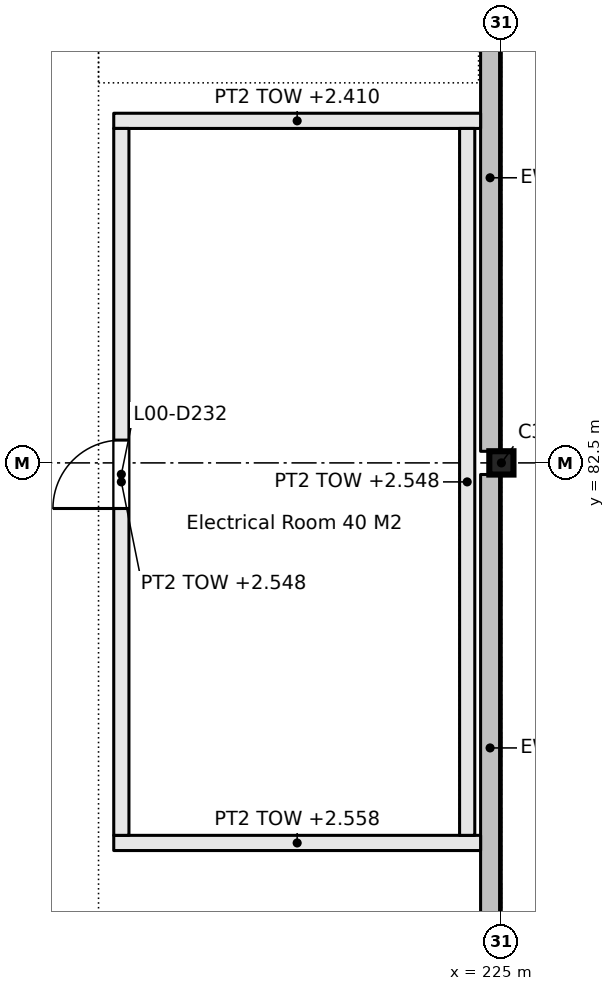
"""IFC4 building model, lengths in metres.
Left out: names, types, materials, properties, quantities, classifications, styles, units other than length and angle.
Written with IfcOpenShell. Run it as: python <this file> out.ifc"""

import sys

from ifc_helpers import new_model, si_unit, direction, frame, frame_2d, origin, origin_2d, place, context, subcontext, project, spatial, rectangle, i_section, extrude, element, fill, save


model = new_model("IFC4")
c1 = context("Model", 3, precision=1e-05, world=origin(), true_north=direction((0.0, 1.0)))
c2 = subcontext(c1, "Body", "Model", "MODEL_VIEW")
j1 = project(units=[si_unit("LENGTHUNIT", "METRE"), si_unit("PLANEANGLEUNIT", "RADIAN")], contexts=[c1])
p1 = place(None, origin())
s1 = spatial("IfcSite", under=j1, at=p1, CompositionType="ELEMENT")
p2 = place(p1, origin())
s2 = spatial("IfcBuilding", under=s1, at=p2, CompositionType="ELEMENT")
p3 = place(p2, origin())
s3 = spatial("IfcBuildingStorey", under=s2, at=p3, CompositionType="ELEMENT", Elevation=0.0)
p4 = place(p3, frame((225.0, 82.5, -0.25), z_axis=(0.0, 0.0, 1.0), x_axis=(0.0, 1.0, 0.0)))
e1 = element("IfcColumn", 1, at=p4, inside=s3, PredefinedType="COLUMN", context=c2, shape_type="SweptSolid", body=[
    extrude(i_section(OverallWidth=0.307, OverallDepth=0.318, WebThickness=0.013, FlangeThickness=0.021, FilletRadius=0.015, at=origin_2d()), origin(), (0.0, 0.0, 1.0), 3.55),
])
p5 = place(p3, frame((219.9, 77.5, 0.0), z_axis=(0.0, 0.0, 1.0), x_axis=(1.0, 0.0, 0.0)))
e2 = element("IfcWall", 2, at=p5, inside=s3, PredefinedType="PARTITIONING", context=c2, shape_type="SweptSolid", body=[
    extrude(rectangle(XDim=4.826, YDim=0.2, at=frame_2d((2.413, 0.0))), origin(), (0.0, 0.0, 1.0), 2.558),
])
p6 = place(p3, frame((219.9, 87.0, 0.0), z_axis=(0.0, 0.0, 1.0), x_axis=(1.0, 0.0, 0.0)))
e3 = element("IfcWall", 3, at=p6, inside=s3, PredefinedType="PARTITIONING", context=c2, shape_type="SweptSolid", body=[
    extrude(rectangle(XDim=4.826, YDim=0.2, at=frame_2d((2.413, 0.0))), origin(), (0.0, 0.0, 1.0), 2.41),
])
p7 = place(p3, frame((220.0, 77.6, 0.0), z_axis=(0.0, 0.0, 1.0), x_axis=(0.0, 1.0, 0.0)))
e4 = element("IfcWall", 4, at=p7, inside=s3, PredefinedType="PARTITIONING", context=c2, shape_type="SweptSolid", body=[
    extrude(rectangle(XDim=9.3, YDim=0.2, at=frame_2d((4.65, 0.0))), origin(), (0.0, 0.0, 1.0), 2.548),
])
p8 = place(p7, frame((4.3, 0.0, 0.0)))
e5 = element("IfcOpeningElement", 5, at=p8, cuts=e4, PredefinedType="OPENING", context=c2, shape_type="SweptSolid", body=[
    extrude(rectangle(XDim=0.9, YDim=2.1, at=frame_2d((0.45, 1.05))), frame((0.0, 0.11, 0.0), z_axis=(0.0, -1.0, 0.0), x_axis=(1.0, 0.0, 0.0)), (0.0, 0.0, 1.0), 0.22),
])
p9 = place(p3, frame((224.55, 77.6, 0.0), z_axis=(0.0, 0.0, 1.0), x_axis=(0.0, 1.0, 0.0)))
e6 = element("IfcWall", 6, at=p9, inside=s3, PredefinedType="PARTITIONING", context=c2, shape_type="SweptSolid", body=[
    extrude(rectangle(XDim=9.3, YDim=0.2, at=frame_2d((4.65, 0.0))), origin(), (0.0, 0.0, 1.0), 2.548),
])
p10 = place(p3, frame((224.851, 75.153, 0.0), z_axis=(0.0, 0.0, 1.0), x_axis=(0.0, 1.0, 0.0)))
e7 = element("IfcWall", 7, at=p10, inside=s3, PredefinedType="SOLIDWALL", context=c2, shape_type="SweptSolid", body=[
    extrude(rectangle(XDim=7.195, YDim=0.25, at=frame_2d((3.597, 0.0))), origin(), (0.0, 0.0, 1.0), 2.6),
])
p11 = place(p3, frame((224.851, 82.653, 0.0), z_axis=(0.0, 0.0, 1.0), x_axis=(0.0, 1.0, 0.0)))
e8 = element("IfcWall", 8, at=p11, inside=s3, PredefinedType="SOLIDWALL", context=c2, shape_type="SweptSolid", body=[
    extrude(rectangle(XDim=7.197, YDim=0.25, at=frame_2d((3.599, 0.0))), origin(), (0.0, 0.0, 1.0), 2.6),
])
p12 = place(p8, origin())
e9 = element("IfcDoor", 9, at=p12, inside=s3, OperationType="SINGLE_SWING_RIGHT", PredefinedType="DOOR", context=c2, shape_type="SweptSolid", body=[
    extrude(rectangle(XDim=0.9, YDim=2.1, at=frame_2d((0.45, 1.05))), frame((0.0, 0.025, 0.0), z_axis=(0.0, -1.0, 0.0), x_axis=(1.0, 0.0, 0.0)), (0.0, 0.0, 1.0), 0.05),
])
fill(e5, e9)
save(model, sys.argv[1])
